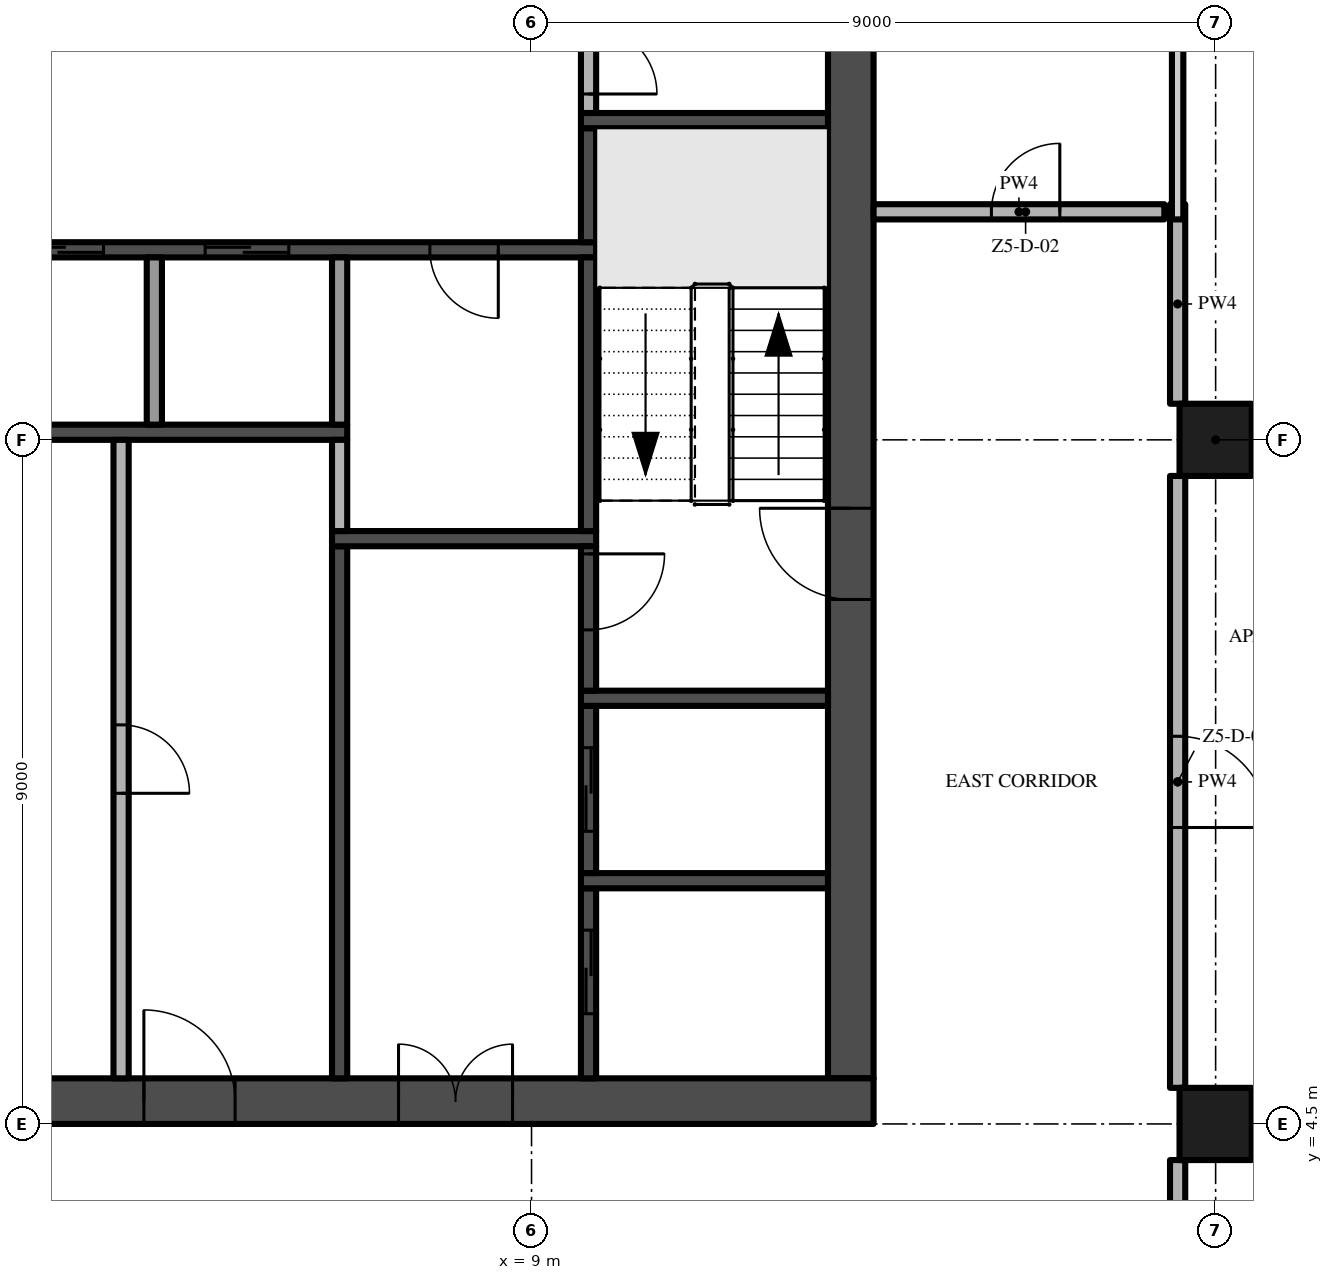
"""IFC4 building model, lengths in metres.
Left out: names, types, materials, properties, quantities, classifications, styles, units other than length and angle.
Written with IfcOpenShell. Run it as: python <this file> out.ifc"""

import sys

from ifc_helpers import new_model, si_unit, direction, frame, frame_2d, origin, origin_2d, place, context, subcontext, project, spatial, rectangle, extrude, element, fill, save


model = new_model("IFC4")
c1 = context("Model", 3, precision=1e-05, world=origin(), true_north=direction((0.0, 1.0)))
c2 = subcontext(c1, "Body", "Model", "MODEL_VIEW")
j1 = project(units=[si_unit("LENGTHUNIT", "METRE"), si_unit("PLANEANGLEUNIT", "RADIAN")], contexts=[c1])
p1 = place(None, origin())
s1 = spatial("IfcSite", under=j1, at=p1, CompositionType="ELEMENT")
p2 = place(p1, origin())
s2 = spatial("IfcBuilding", under=s1, at=p2, CompositionType="ELEMENT")
p3 = place(p2, frame((0.0, 0.0, 273.0)))
s3 = spatial("IfcBuildingStorey", under=s2, at=p3, CompositionType="ELEMENT", Elevation=273.0)
p4 = place(p3, frame((-13.5, 4.8, -0.3), z_axis=(0.0, 0.0, 1.0), x_axis=(1.0, 0.0, 0.0)))
e1 = element("IfcWall", 1, at=p4, inside=s3, PredefinedType="SHEAR", context=c2, shape_type="SweptSolid", body=[
    extrude(rectangle(XDim=27.0, YDim=0.6, at=frame_2d((13.5, 0.0))), origin(), (0.0, 0.0, 1.0), 3.8),
])
p5 = place(p4, frame((12.0, 0.0, 0.3)))
e2 = element("IfcOpeningElement", 2, at=p5, cuts=e1, PredefinedType="OPENING", context=c2, shape_type="SweptSolid", body=[
    extrude(rectangle(XDim=3.0, YDim=2.4, at=frame_2d((1.5, 1.2))), frame((0.0, 0.31, 0.0), z_axis=(0.0, -1.0, 0.0), x_axis=(1.0, 0.0, 0.0)), (0.0, 0.0, 1.0), 0.62),
])
p6 = place(p4, frame((4.9, 0.0, 0.3)))
e3 = element("IfcOpeningElement", 3, at=p6, cuts=e1, PredefinedType="OPENING", context=c2, shape_type="SweptSolid", body=[
    extrude(rectangle(XDim=1.2, YDim=2.2, at=frame_2d((0.6, 1.1))), frame((0.0, 0.31, 0.0), z_axis=(0.0, -1.0, 0.0), x_axis=(1.0, 0.0, 0.0)), (0.0, 0.0, 1.0), 0.62),
])
p7 = place(p4, frame((20.75, 0.0, 0.3)))
e4 = element("IfcOpeningElement", 4, at=p7, cuts=e1, PredefinedType="OPENING", context=c2, shape_type="SweptSolid", body=[
    extrude(rectangle(XDim=1.5, YDim=2.2, at=frame_2d((0.75, 1.1))), frame((0.0, 0.31, 0.0), z_axis=(0.0, -1.0, 0.0), x_axis=(1.0, 0.0, 0.0)), (0.0, 0.0, 1.0), 0.62),
])
p8 = place(p4, frame((17.4, 0.0, 0.3)))
e5 = element("IfcOpeningElement", 5, at=p8, cuts=e1, PredefinedType="OPENING", context=c2, shape_type="SweptSolid", body=[
    extrude(rectangle(XDim=1.2, YDim=2.2, at=frame_2d((0.6, 1.1))), frame((0.0, 0.31, 0.0), z_axis=(0.0, -1.0, 0.0), x_axis=(1.0, 0.0, 0.0)), (0.0, 0.0, 1.0), 0.62),
])
p9 = place(p3, frame((13.2, 5.1, -0.3), z_axis=(0.0, 0.0, 1.0), x_axis=(0.0, 1.0, 0.0)))
e6 = element("IfcWall", 6, at=p9, inside=s3, PredefinedType="SHEAR", context=c2, shape_type="SweptSolid", body=[
    extrude(rectangle(XDim=16.8, YDim=0.6, at=frame_2d((8.4, 0.0))), origin(), (0.0, 0.0, 1.0), 3.8),
])
p10 = place(p9, frame((6.3, 0.0, 0.3)))
e7 = element("IfcOpeningElement", 7, at=p10, cuts=e6, PredefinedType="OPENING", context=c2, shape_type="SweptSolid", body=[
    extrude(rectangle(XDim=1.2, YDim=2.2, at=frame_2d((0.6, 1.1))), frame((0.0, 0.31, 0.0), z_axis=(0.0, -1.0, 0.0), x_axis=(1.0, 0.0, 0.0)), (0.0, 0.0, 1.0), 0.62),
])
for number, where, z_axis, x_axis in (
    (8, (18.0, 13.5, 0.0), (0.0, 0.0, 1.0), (1.0, 0.0, 0.0)),
    (9, (18.0, 4.5, 0.0), (0.0, 0.0, 1.0), (1.0, 0.0, 0.0)),
):
    element("IfcColumn", number, at=place(p3, frame(where, z_axis=z_axis, x_axis=x_axis)), inside=s3, PredefinedType="COLUMN", context=c2, shape_type="SweptSolid", body=[
        extrude(rectangle(XDim=0.95, YDim=0.95, at=origin_2d()), origin(), (0.0, 0.0, 1.0), 3.5),
    ])
p11 = place(p3, frame((1.5, 13.6, 0.0), z_axis=(0.0, 0.0, 1.0), x_axis=(1.0, 0.0, 0.0)))
e10 = element("IfcWall", 10, at=p11, inside=s3, PredefinedType="SHEAR", context=c2, shape_type="SweptSolid", body=[
    extrude(rectangle(XDim=5.075, YDim=0.2, at=frame_2d((2.538, 0.0))), origin(), (0.0, 0.0, 1.0), 3.5),
])
p12 = place(p3, frame((9.85, 16.0, 0.0), z_axis=(0.0, 0.0, 1.0), x_axis=(-1.0, 0.0, 0.0)))
e11 = element("IfcWall", 11, at=p12, inside=s3, PredefinedType="SHEAR", context=c2, shape_type="SweptSolid", body=[
    extrude(rectangle(XDim=8.35, YDim=0.2, at=frame_2d((4.175, 0.0))), origin(), (0.0, 0.0, 1.0), 3.5),
])
p13 = place(p12, frame((6.481, 0.0, 0.0)))
e12 = element("IfcOpeningElement", 12, at=p13, cuts=e11, PredefinedType="OPENING", context=c2, shape_type="SweptSolid", body=[
    extrude(rectangle(XDim=1.1, YDim=2.1, at=frame_2d((0.55, 1.05))), frame((0.0, 0.11, 0.0), z_axis=(0.0, -1.0, 0.0), x_axis=(1.0, 0.0, 0.0)), (0.0, 0.0, 1.0), 0.22),
])
p14 = place(p12, frame((4.044, 0.0, 0.0)))
e13 = element("IfcOpeningElement", 13, at=p14, cuts=e11, PredefinedType="OPENING", context=c2, shape_type="SweptSolid", body=[
    extrude(rectangle(XDim=1.1, YDim=2.1, at=frame_2d((0.55, 1.05))), frame((0.0, 0.11, 0.0), z_axis=(0.0, -1.0, 0.0), x_axis=(1.0, 0.0, 0.0)), (0.0, 0.0, 1.0), 0.22),
])
p15 = place(p12, frame((1.288, 0.0, 0.0)))
e14 = element("IfcOpeningElement", 14, at=p15, cuts=e11, PredefinedType="OPENING", context=c2, shape_type="SweptSolid", body=[
    extrude(rectangle(XDim=0.9, YDim=2.1, at=frame_2d((0.45, 1.05))), frame((0.0, 0.11, 0.0), z_axis=(0.0, -1.0, 0.0), x_axis=(1.0, 0.0, 0.0)), (0.0, 0.0, 1.0), 0.22),
])
p16 = place(p3, frame((3.6, 13.5, 0.0), z_axis=(0.0, 0.0, 1.0), x_axis=(0.0, -1.0, 0.0)))
e15 = element("IfcWall", 15, at=p16, inside=s3, PredefinedType="PARTITIONING", context=c2, shape_type="SweptSolid", body=[
    extrude(rectangle(XDim=8.4, YDim=0.2, at=frame_2d((4.2, 0.0))), origin(), (0.0, 0.0, 1.0), 3.5),
])
p17 = place(p16, frame((3.75, 0.0, 0.0)))
e16 = element("IfcOpeningElement", 16, at=p17, cuts=e15, PredefinedType="OPENING", context=c2, shape_type="SweptSolid", body=[
    extrude(rectangle(XDim=0.9, YDim=2.1, at=frame_2d((0.45, 1.05))), frame((0.0, 0.11, 0.0), z_axis=(0.0, -1.0, 0.0), x_axis=(1.0, 0.0, 0.0)), (0.0, 0.0, 1.0), 0.22),
])
p18 = place(p3, frame((4.037, 13.7, 0.0), z_axis=(0.0, 0.0, 1.0), x_axis=(0.0, 1.0, 0.0)))
e17 = element("IfcWall", 17, at=p18, inside=s3, PredefinedType="PARTITIONING", context=c2, shape_type="SweptSolid", body=[
    extrude(rectangle(XDim=2.2, YDim=0.2, at=frame_2d((1.1, 0.0))), origin(), (0.0, 0.0, 1.0), 3.5),
])
p19 = place(p3, frame((6.475, 5.1, 0.0), z_axis=(0.0, 0.0, 1.0), x_axis=(0.0, 1.0, 0.0)))
e18 = element("IfcWall", 18, at=p19, inside=s3, PredefinedType="SHEAR", context=c2, shape_type="SweptSolid", body=[
    extrude(rectangle(XDim=7.0, YDim=0.2, at=frame_2d((3.5, 0.0))), origin(), (0.0, 0.0, 1.0), 3.5),
])
p20 = place(p3, frame((6.375, 12.2, 0.0), z_axis=(0.0, 0.0, 1.0), x_axis=(1.0, 0.0, 0.0)))
e19 = element("IfcWall", 19, at=p20, inside=s3, PredefinedType="SHEAR", context=c2, shape_type="SweptSolid", body=[
    extrude(rectangle(XDim=3.475, YDim=0.2, at=frame_2d((1.738, 0.0))), origin(), (0.0, 0.0, 1.0), 3.5),
])
p21 = place(p3, frame((6.475, 12.3, 0.0), z_axis=(0.0, 0.0, 1.0), x_axis=(0.0, 1.0, 0.0)))
e20 = element("IfcWall", 20, at=p21, inside=s3, PredefinedType="PARTITIONING", context=c2, shape_type="SweptSolid", body=[
    extrude(rectangle(XDim=1.2, YDim=0.2, at=frame_2d((0.6, 0.0))), origin(), (0.0, 0.0, 1.0), 3.5),
])
p22 = place(p3, frame((6.475, 13.7, 0.0), z_axis=(0.0, 0.0, 1.0), x_axis=(0.0, 1.0, 0.0)))
e21 = element("IfcWall", 21, at=p22, inside=s3, PredefinedType="PARTITIONING", context=c2, shape_type="SweptSolid", body=[
    extrude(rectangle(XDim=2.2, YDim=0.2, at=frame_2d((1.1, 0.0))), origin(), (0.0, 0.0, 1.0), 3.5),
])
p23 = place(p3, frame((9.75, 5.1, 0.0), z_axis=(0.0, 0.0, 1.0), x_axis=(0.0, 1.0, 0.0)))
e22 = element("IfcWall", 22, at=p23, inside=s3, PredefinedType="SHEAR", context=c2, shape_type="SweptSolid", body=[
    extrude(rectangle(XDim=2.5, YDim=0.2, at=frame_2d((1.25, 0.0))), origin(), (0.0, 0.0, 1.0), 3.5),
])
p24 = place(p23, frame((0.85, 0.0, 0.0)))
e23 = element("IfcOpeningElement", 23, at=p24, cuts=e22, PredefinedType="OPENING", context=c2, shape_type="SweptSolid", body=[
    extrude(rectangle(XDim=1.1, YDim=2.1, at=frame_2d((0.55, 1.05))), frame((0.0, 0.11, 0.0), z_axis=(0.0, -1.0, 0.0), x_axis=(1.0, 0.0, 0.0)), (0.0, 0.0, 1.0), 0.22),
])
p25 = place(p3, frame((9.65, 7.7, 0.0), z_axis=(0.0, 0.0, 1.0), x_axis=(1.0, 0.0, 0.0)))
e24 = element("IfcWall", 24, at=p25, inside=s3, PredefinedType="SHEAR", context=c2, shape_type="SweptSolid", body=[
    extrude(rectangle(XDim=3.25, YDim=0.2, at=frame_2d((1.625, 0.0))), origin(), (0.0, 0.0, 1.0), 3.5),
])
p26 = place(p3, frame((9.75, 7.8, 0.0), z_axis=(0.0, 0.0, 1.0), x_axis=(0.0, 1.0, 0.0)))
e25 = element("IfcWall", 25, at=p26, inside=s3, PredefinedType="SHEAR", context=c2, shape_type="SweptSolid", body=[
    extrude(rectangle(XDim=2.2, YDim=0.2, at=frame_2d((1.1, 0.0))), origin(), (0.0, 0.0, 1.0), 3.5),
])
p27 = place(p26, frame((0.55, 0.0, 0.0)))
e26 = element("IfcOpeningElement", 26, at=p27, cuts=e25, PredefinedType="OPENING", context=c2, shape_type="SweptSolid", body=[
    extrude(rectangle(XDim=1.1, YDim=2.1, at=frame_2d((0.55, 1.05))), frame((0.0, 0.11, 0.0), z_axis=(0.0, -1.0, 0.0), x_axis=(1.0, 0.0, 0.0)), (0.0, 0.0, 1.0), 0.22),
])
p28 = place(p3, frame((9.65, 10.1, 0.0), z_axis=(0.0, 0.0, 1.0), x_axis=(1.0, 0.0, 0.0)))
e27 = element("IfcWall", 27, at=p28, inside=s3, PredefinedType="SHEAR", context=c2, shape_type="SweptSolid", body=[
    extrude(rectangle(XDim=3.25, YDim=0.2, at=frame_2d((1.625, 0.0))), origin(), (0.0, 0.0, 1.0), 3.5),
])
p29 = place(p3, frame((9.75, 12.1, 0.0), z_axis=(0.0, 0.0, 1.0), x_axis=(0.0, -1.0, 0.0)))
e28 = element("IfcWall", 28, at=p29, inside=s3, PredefinedType="SHEAR", context=c2, shape_type="SweptSolid", body=[
    extrude(rectangle(XDim=1.9, YDim=0.2, at=frame_2d((0.95, 0.0))), origin(), (0.0, 0.0, 1.0), 3.5),
])
p30 = place(p29, frame((0.1, 0.0, 0.0)))
e29 = element("IfcOpeningElement", 29, at=p30, cuts=e28, PredefinedType="OPENING", context=c2, shape_type="SweptSolid", body=[
    extrude(rectangle(XDim=1.0, YDim=2.2, at=frame_2d((0.5, 1.1))), frame((0.0, 0.11, 0.0), z_axis=(0.0, -1.0, 0.0), x_axis=(1.0, 0.0, 0.0)), (0.0, 0.0, 1.0), 0.22),
])
p31 = place(p3, frame((9.75, 12.3, 0.0), z_axis=(0.0, 0.0, 1.0), x_axis=(0.0, 1.0, 0.0)))
e30 = element("IfcWall", 30, at=p31, inside=s3, PredefinedType="SHEAR", context=c2, shape_type="SweptSolid", body=[
    extrude(rectangle(XDim=3.6, YDim=0.2, at=frame_2d((1.8, 0.0))), origin(), (0.0, 0.0, 1.0), 3.5),
])
p32 = place(p3, frame((9.75, 16.1, 0.0), z_axis=(0.0, 0.0, 1.0), x_axis=(0.0, 1.0, 0.0)))
e31 = element("IfcWall", 31, at=p32, inside=s3, PredefinedType="SHEAR", context=c2, shape_type="SweptSolid", body=[
    extrude(rectangle(XDim=1.5, YDim=0.2, at=frame_2d((0.75, 0.0))), origin(), (0.0, 0.0, 1.0), 3.5),
])
p33 = place(p3, frame((9.65, 17.7, 0.0), z_axis=(0.0, 0.0, 1.0), x_axis=(1.0, 0.0, 0.0)))
e32 = element("IfcWall", 32, at=p33, inside=s3, PredefinedType="SHEAR", context=c2, shape_type="SweptSolid", body=[
    extrude(rectangle(XDim=3.25, YDim=0.2, at=frame_2d((1.625, 0.0))), origin(), (0.0, 0.0, 1.0), 3.5),
])
p34 = place(p3, frame((9.75, 19.2, 0.0), z_axis=(0.0, 0.0, 1.0), x_axis=(0.0, -1.0, 0.0)))
e33 = element("IfcWall", 33, at=p34, inside=s3, PredefinedType="PARTITIONING", context=c2, shape_type="SweptSolid", body=[
    extrude(rectangle(XDim=1.4, YDim=0.2, at=frame_2d((0.7, 0.0))), origin(), (0.0, 0.0, 1.0), 3.5),
])
p35 = place(p34, frame((0.25, 0.0, 0.0)))
e34 = element("IfcOpeningElement", 34, at=p35, cuts=e33, PredefinedType="OPENING", context=c2, shape_type="SweptSolid", body=[
    extrude(rectangle(XDim=0.9, YDim=2.1, at=frame_2d((0.45, 1.05))), frame((0.0, 0.11, 0.0), z_axis=(0.0, -1.0, 0.0), x_axis=(1.0, 0.0, 0.0)), (0.0, 0.0, 1.0), 0.22),
])
p36 = place(p3, frame((13.5, 16.5, 0.0), z_axis=(0.0, 0.0, 1.0), x_axis=(1.0, 0.0, 0.0)))
e35 = element("IfcWall", 35, at=p36, inside=s3, PredefinedType="PARTITIONING", context=c2, shape_type="SweptSolid", body=[
    extrude(rectangle(XDim=3.825, YDim=0.2, at=frame_2d((1.913, 0.0))), origin(), (0.0, 0.0, 1.0), 3.5),
])
p37 = place(p36, frame((1.55, 0.0, 0.0)))
e36 = element("IfcOpeningElement", 36, at=p37, cuts=e35, PredefinedType="OPENING", context=c2, shape_type="SweptSolid", body=[
    extrude(rectangle(XDim=0.9, YDim=2.1, at=frame_2d((0.45, 1.05))), frame((0.0, 0.11, 0.0), z_axis=(0.0, -1.0, 0.0), x_axis=(1.0, 0.0, 0.0)), (0.0, 0.0, 1.0), 0.22),
])
p38 = place(p3, frame((17.5, -0.2, 0.0), z_axis=(0.0, 0.0, 1.0), x_axis=(0.0, 1.0, 0.0)))
e37 = element("IfcWall", 37, at=p38, inside=s3, PredefinedType="PARTITIONING", context=c2, shape_type="SweptSolid", body=[
    extrude(rectangle(XDim=4.225, YDim=0.2, at=frame_2d((2.112, 0.0))), origin(), (0.0, 0.0, 1.0), 3.5),
])
p39 = place(p3, frame((17.5, 13.025, 0.0), z_axis=(0.0, 0.0, 1.0), x_axis=(0.0, -1.0, 0.0)))
e38 = element("IfcWall", 38, at=p39, inside=s3, PredefinedType="PARTITIONING", context=c2, shape_type="SweptSolid", body=[
    extrude(rectangle(XDim=8.05, YDim=0.2, at=frame_2d((4.025, 0.0))), origin(), (0.0, 0.0, 1.0), 3.5),
])
p40 = place(p39, frame((3.425, 0.0, 0.0)))
e39 = element("IfcOpeningElement", 39, at=p40, cuts=e38, PredefinedType="OPENING", context=c2, shape_type="SweptSolid", body=[
    extrude(rectangle(XDim=1.2, YDim=2.4, at=frame_2d((0.6, 1.2))), frame((0.0, 0.11, 0.0), z_axis=(0.0, -1.0, 0.0), x_axis=(1.0, 0.0, 0.0)), (0.0, 0.0, 1.0), 0.22),
])
p41 = place(p3, frame((17.5, 13.975, 0.0), z_axis=(0.0, 0.0, 1.0), x_axis=(0.0, 1.0, 0.0)))
e40 = element("IfcWall", 40, at=p41, inside=s3, PredefinedType="PARTITIONING", context=c2, shape_type="SweptSolid", body=[
    extrude(rectangle(XDim=2.625, YDim=0.2, at=frame_2d((1.312, 0.0))), origin(), (0.0, 0.0, 1.0), 3.5),
])
p42 = place(p3, frame((17.5, 16.4, 0.0), z_axis=(0.0, 0.0, 1.0), x_axis=(0.0, 1.0, 0.0)))
e41 = element("IfcWall", 41, at=p42, inside=s3, PredefinedType="PARTITIONING", context=c2, shape_type="SweptSolid", body=[
    extrude(rectangle(XDim=5.2, YDim=0.15, at=frame_2d((2.6, 0.0))), origin(), (0.0, 0.0, 1.0), 3.5),
])
p43 = place(p10, frame((1.2, 0.0, 0.0), z_axis=(0.0, 0.0, 1.0), x_axis=(-1.0, 0.0, 0.0)))
e42 = element("IfcDoor", 42, at=p43, inside=s3, OperationType="SINGLE_SWING_LEFT", PredefinedType="DOOR", context=c2, shape_type="SweptSolid", body=[
    extrude(rectangle(XDim=1.2, YDim=2.2, at=frame_2d((0.6, 1.1))), frame((0.0, 0.025, 0.0), z_axis=(0.0, -1.0, 0.0), x_axis=(1.0, 0.0, 0.0)), (0.0, 0.0, 1.0), 0.05),
])
fill(e7, e42)
p44 = place(p7, frame((1.5, 0.0, 0.0), z_axis=(0.0, 0.0, 1.0), x_axis=(-1.0, 0.0, 0.0)))
e43 = element("IfcDoor", 43, at=p44, inside=s3, OperationType="DOUBLE_DOOR_SINGLE_SWING", PredefinedType="DOOR", context=c2, shape_type="SweptSolid", body=[
    extrude(rectangle(XDim=1.5, YDim=2.2, at=frame_2d((0.75, 1.1))), frame((0.0, 0.025, 0.0), z_axis=(0.0, -1.0, 0.0), x_axis=(1.0, 0.0, 0.0)), (0.0, 0.0, 1.0), 0.05),
])
fill(e4, e43)
p45 = place(p8, frame((1.2, 0.0, 0.0), z_axis=(0.0, 0.0, 1.0), x_axis=(-1.0, 0.0, 0.0)))
e44 = element("IfcDoor", 44, at=p45, inside=s3, OperationType="SINGLE_SWING_RIGHT", PredefinedType="DOOR", context=c2, shape_type="SweptSolid", body=[
    extrude(rectangle(XDim=1.2, YDim=2.2, at=frame_2d((0.6, 1.1))), frame((0.0, 0.025, 0.0), z_axis=(0.0, -1.0, 0.0), x_axis=(1.0, 0.0, 0.0)), (0.0, 0.0, 1.0), 0.05),
])
fill(e5, e44)
p46 = place(p30, origin())
e45 = element("IfcDoor", 45, at=p46, inside=s3, OperationType="SINGLE_SWING_LEFT", PredefinedType="DOOR", context=c2, shape_type="SweptSolid", body=[
    extrude(rectangle(XDim=1.0, YDim=2.2, at=frame_2d((0.5, 1.1))), frame((0.0, 0.025, 0.0), z_axis=(0.0, -1.0, 0.0), x_axis=(1.0, 0.0, 0.0)), (0.0, 0.0, 1.0), 0.05),
])
fill(e29, e45)
p47 = place(p13, origin())
e46 = element("IfcDoor", 46, at=p47, inside=s3, OperationType="SLIDING_TO_RIGHT", PredefinedType="DOOR", context=c2, shape_type="SweptSolid", body=[
    extrude(rectangle(XDim=1.1, YDim=2.1, at=frame_2d((0.55, 1.05))), frame((0.0, 0.025, 0.0), z_axis=(0.0, -1.0, 0.0), x_axis=(1.0, 0.0, 0.0)), (0.0, 0.0, 1.0), 0.05),
])
fill(e12, e46)
p48 = place(p14, origin())
e47 = element("IfcDoor", 47, at=p48, inside=s3, OperationType="SLIDING_TO_RIGHT", PredefinedType="DOOR", context=c2, shape_type="SweptSolid", body=[
    extrude(rectangle(XDim=1.1, YDim=2.1, at=frame_2d((0.55, 1.05))), frame((0.0, 0.025, 0.0), z_axis=(0.0, -1.0, 0.0), x_axis=(1.0, 0.0, 0.0)), (0.0, 0.0, 1.0), 0.05),
])
fill(e13, e47)
p49 = place(p24, origin())
e48 = element("IfcDoor", 48, at=p49, inside=s3, OperationType="SLIDING_TO_RIGHT", PredefinedType="DOOR", context=c2, shape_type="SweptSolid", body=[
    extrude(rectangle(XDim=1.1, YDim=2.1, at=frame_2d((0.55, 1.05))), frame((0.0, 0.025, 0.0), z_axis=(0.0, -1.0, 0.0), x_axis=(1.0, 0.0, 0.0)), (0.0, 0.0, 1.0), 0.05),
])
fill(e23, e48)
p50 = place(p27, origin())
e49 = element("IfcDoor", 49, at=p50, inside=s3, OperationType="SLIDING_TO_RIGHT", PredefinedType="DOOR", context=c2, shape_type="SweptSolid", body=[
    extrude(rectangle(XDim=1.1, YDim=2.1, at=frame_2d((0.55, 1.05))), frame((0.0, 0.025, 0.0), z_axis=(0.0, -1.0, 0.0), x_axis=(1.0, 0.0, 0.0)), (0.0, 0.0, 1.0), 0.05),
])
fill(e26, e49)
p51 = place(p15, origin())
e50 = element("IfcDoor", 50, at=p51, inside=s3, OperationType="SINGLE_SWING_LEFT", PredefinedType="DOOR", context=c2, shape_type="SweptSolid", body=[
    extrude(rectangle(XDim=0.9, YDim=2.1, at=frame_2d((0.45, 1.05))), frame((0.0, 0.025, 0.0), z_axis=(0.0, -1.0, 0.0), x_axis=(1.0, 0.0, 0.0)), (0.0, 0.0, 1.0), 0.05),
])
fill(e14, e50)
p52 = place(p35, origin())
e51 = element("IfcDoor", 51, at=p52, inside=s3, OperationType="SINGLE_SWING_RIGHT", PredefinedType="DOOR", context=c2, shape_type="SweptSolid", body=[
    extrude(rectangle(XDim=0.9, YDim=2.1, at=frame_2d((0.45, 1.05))), frame((0.0, 0.025, 0.0), z_axis=(0.0, -1.0, 0.0), x_axis=(1.0, 0.0, 0.0)), (0.0, 0.0, 1.0), 0.05),
])
fill(e34, e51)
p53 = place(p17, origin())
e52 = element("IfcDoor", 52, at=p53, inside=s3, OperationType="SINGLE_SWING_RIGHT", PredefinedType="DOOR", context=c2, shape_type="SweptSolid", body=[
    extrude(rectangle(XDim=0.9, YDim=2.1, at=frame_2d((0.45, 1.05))), frame((0.0, 0.025, 0.0), z_axis=(0.0, -1.0, 0.0), x_axis=(1.0, 0.0, 0.0)), (0.0, 0.0, 1.0), 0.05),
])
fill(e16, e52)
p54 = place(p37, origin())
e53 = element("IfcDoor", 53, at=p54, inside=s3, OperationType="SINGLE_SWING_RIGHT", PredefinedType="DOOR", context=c2, shape_type="SweptSolid", body=[
    extrude(rectangle(XDim=0.9, YDim=2.1, at=frame_2d((0.45, 1.05))), frame((0.0, 0.025, 0.0), z_axis=(0.0, -1.0, 0.0), x_axis=(1.0, 0.0, 0.0)), (0.0, 0.0, 1.0), 0.05),
])
fill(e36, e53)
p55 = place(p40, origin())
e54 = element("IfcDoor", 54, at=p55, inside=s3, OperationType="SINGLE_SWING_RIGHT", PredefinedType="DOOR", context=c2, shape_type="SweptSolid", body=[
    extrude(rectangle(XDim=1.2, YDim=2.4, at=frame_2d((0.6, 1.2))), frame((0.0, 0.025, 0.0), z_axis=(0.0, -1.0, 0.0), x_axis=(1.0, 0.0, 0.0)), (0.0, 0.0, 1.0), 0.05),
])
fill(e39, e54)
save(model, sys.argv[1])
